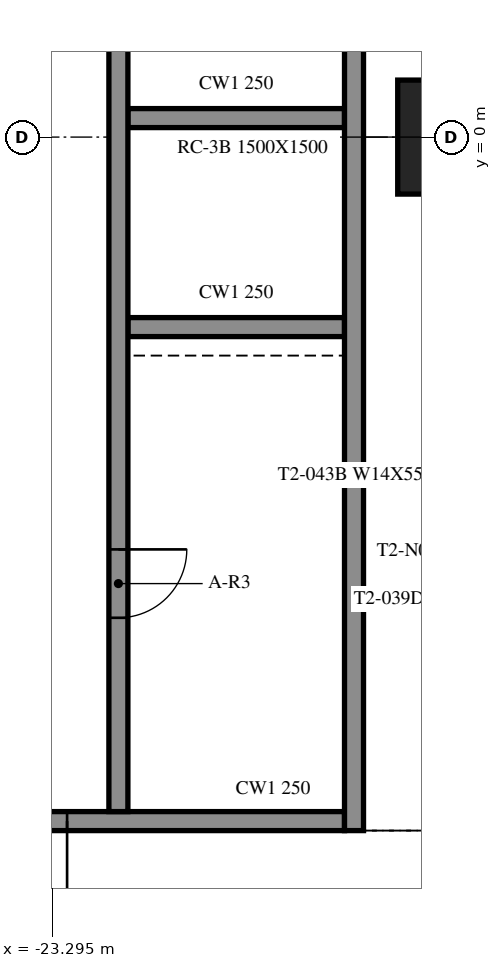
"""IFC4 building model, lengths in metres.
Left out: names, types, materials, properties, quantities, classifications, styles, units other than length and angle.
Written with IfcOpenShell. Run it as: python <this file> out.ifc"""

import sys

from ifc_helpers import new_model, si_unit, direction, frame, frame_2d, origin, origin_2d, place, context, subcontext, project, spatial, rectangle, extrude, element, fill, save


model = new_model("IFC4")
c1 = context("Model", 3, precision=1e-05, world=origin(), true_north=direction((0.0, 1.0)))
c2 = subcontext(c1, "Body", "Model", "MODEL_VIEW")
j1 = project(units=[si_unit("LENGTHUNIT", "METRE"), si_unit("PLANEANGLEUNIT", "RADIAN")], contexts=[c1])
p1 = place(None, origin())
s1 = spatial("IfcSite", under=j1, at=p1, CompositionType="ELEMENT")
p2 = place(p1, origin())
s2 = spatial("IfcBuilding", under=s1, at=p2, CompositionType="ELEMENT")
p3 = place(p2, frame((0.0, 0.0, 80.4)))
s3 = spatial("IfcBuildingStorey", under=s2, at=p3, CompositionType="ELEMENT", Elevation=80.4)
p4 = place(p3, frame((-18.0, 0.0, -0.55), z_axis=(0.0, 0.0, 1.0), x_axis=(1.0, 0.0, 0.0)))
e1 = element("IfcColumn", 1, at=p4, inside=s3, PredefinedType="COLUMN", context=c2, shape_type="SweptSolid", body=[
    extrude(rectangle(XDim=1.5, YDim=1.5, at=origin_2d()), origin(), (0.0, 0.0, 1.0), 4.61),
])
p5 = place(p3, frame((-19.325, -9.125, 0.0), z_axis=(0.0, 0.0, 1.0), x_axis=(0.0, 1.0, 0.0)))
e2 = element("IfcWall", 2, at=p5, inside=s3, PredefinedType="SOLIDWALL", context=c2, shape_type="SweptSolid", body=[
    extrude(rectangle(XDim=24.25, YDim=0.25, at=frame_2d((12.125, 0.0))), origin(), (0.0, 0.0, 1.0), 4.06),
])
p6 = place(p3, frame((-19.45, -9.0, 0.0), z_axis=(0.0, 0.0, 1.0), x_axis=(-1.0, 0.0, 0.0)))
e3 = element("IfcWall", 3, at=p6, inside=s3, PredefinedType="SOLIDWALL", context=c2, shape_type="SweptSolid", body=[
    extrude(rectangle(XDim=9.1, YDim=0.25, at=frame_2d((4.55, 0.0))), origin(), (0.0, 0.0, 1.0), 4.06),
])
p7 = place(p6, frame((3.65, 0.0, 0.0)))
e4 = element("IfcOpeningElement", 4, at=p7, cuts=e3, PredefinedType="OPENING", context=c2, shape_type="SweptSolid", body=[
    extrude(rectangle(XDim=1.8, YDim=2.1, at=frame_2d((0.9, 1.05))), frame((0.0, 0.135, 0.0), z_axis=(0.0, -1.0, 0.0), x_axis=(1.0, 0.0, 0.0)), (0.0, 0.0, 1.0), 0.27),
])
p8 = place(p3, frame((-22.425, 14.875, 0.0), z_axis=(0.0, 0.0, 1.0), x_axis=(0.0, -1.0, 0.0)))
e5 = element("IfcWall", 5, at=p8, inside=s3, PredefinedType="SOLIDWALL", context=c2, shape_type="SweptSolid", body=[
    extrude(rectangle(XDim=23.75, YDim=0.25, at=frame_2d((11.875, 0.0))), origin(), (0.0, 0.0, 1.0), 4.06),
])
p9 = place(p8, frame((20.3, 0.0, 0.0)))
e6 = element("IfcOpeningElement", 6, at=p9, cuts=e5, PredefinedType="OPENING", context=c2, shape_type="SweptSolid", body=[
    extrude(rectangle(XDim=0.9, YDim=2.1, at=frame_2d((0.45, 1.05))), frame((0.0, 0.135, 0.0), z_axis=(0.0, -1.0, 0.0), x_axis=(1.0, 0.0, 0.0)), (0.0, 0.0, 1.0), 0.27),
])
p10 = place(p8, frame((3.847, 0.0, 0.0)))
e7 = element("IfcOpeningElement", 7, at=p10, cuts=e5, PredefinedType="OPENING", context=c2, shape_type="SweptSolid", body=[
    extrude(rectangle(XDim=0.9, YDim=2.1, at=frame_2d((0.45, 1.05))), frame((0.0, 0.135, 0.0), z_axis=(0.0, -1.0, 0.0), x_axis=(1.0, 0.0, 0.0)), (0.0, 0.0, 1.0), 0.27),
])
p11 = place(p8, frame((0.772, 0.0, 0.0)))
e8 = element("IfcOpeningElement", 8, at=p11, cuts=e5, PredefinedType="OPENING", context=c2, shape_type="SweptSolid", body=[
    extrude(rectangle(XDim=0.9, YDim=2.1, at=frame_2d((0.45, 1.05))), frame((0.0, 0.135, 0.0), z_axis=(0.0, -1.0, 0.0), x_axis=(1.0, 0.0, 0.0)), (0.0, 0.0, 1.0), 0.27),
])
for number, where, z_axis, x_axis in (
    (9, (-22.3, -2.5, 0.0), (0.0, 0.0, 1.0), (1.0, 0.0, 0.0)),
    (10, (-22.3, 0.25, 0.0), (0.0, 0.0, 1.0), (1.0, 0.0, 0.0)),
):
    element("IfcWall", number, at=place(p3, frame(where, z_axis=z_axis, x_axis=x_axis)), inside=s3, PredefinedType="SOLIDWALL", context=c2, shape_type="SweptSolid", body=[
        extrude(rectangle(XDim=2.85, YDim=0.25, at=frame_2d((1.425, 0.0))), origin(), (0.0, 0.0, 1.0), 4.06),
    ])
p12 = place(p7, origin())
e11 = element("IfcDoor", 11, at=p12, inside=s3, OperationType="DOUBLE_DOOR_SINGLE_SWING", PredefinedType="DOOR", context=c2, shape_type="SweptSolid", body=[
    extrude(rectangle(XDim=1.8, YDim=2.1, at=frame_2d((0.9, 1.05))), frame((0.0, 0.025, 0.0), z_axis=(0.0, -1.0, 0.0), x_axis=(1.0, 0.0, 0.0)), (0.0, 0.0, 1.0), 0.05),
])
fill(e4, e11)
p13 = place(p9, origin())
e12 = element("IfcDoor", 12, at=p13, inside=s3, OperationType="SINGLE_SWING_LEFT", PredefinedType="DOOR", context=c2, shape_type="SweptSolid", body=[
    extrude(rectangle(XDim=0.9, YDim=2.1, at=frame_2d((0.45, 1.05))), frame((0.0, 0.025, 0.0), z_axis=(0.0, -1.0, 0.0), x_axis=(1.0, 0.0, 0.0)), (0.0, 0.0, 1.0), 0.05),
])
fill(e6, e12)
save(model, sys.argv[1])
